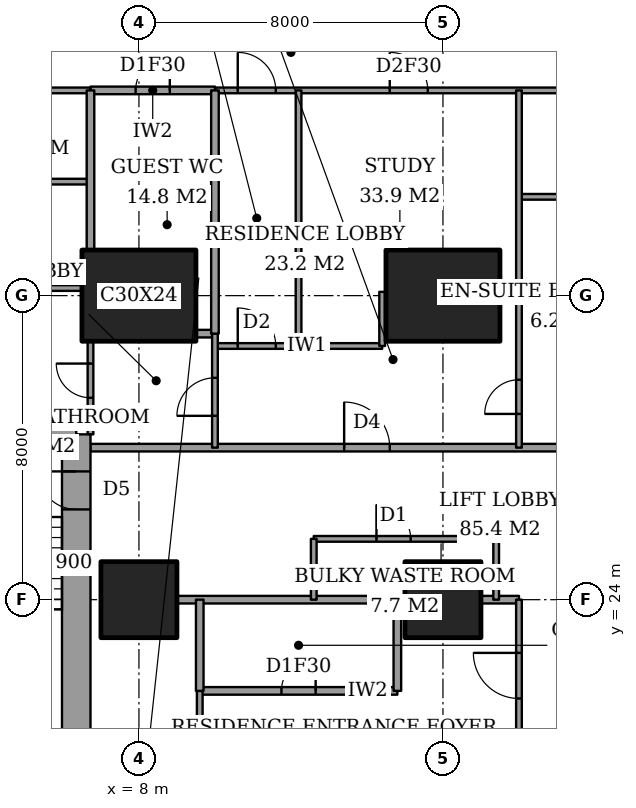
"""IFC4 building model, lengths in metres.
Left out: names, types, materials, properties, quantities, classifications, styles, units other than length and angle.
Written with IfcOpenShell. Run it as: python <this file> out.ifc"""

import sys

from ifc_helpers import new_model, si_unit, direction, frame, frame_2d, origin, origin_2d, place, context, subcontext, project, spatial, rectangle, extrude, element, fill, save


model = new_model("IFC4")
c1 = context("Model", 3, precision=1e-05, world=origin(), true_north=direction((0.0, 1.0)))
c2 = subcontext(c1, "Body", "Model", "MODEL_VIEW")
j1 = project(units=[si_unit("LENGTHUNIT", "METRE"), si_unit("PLANEANGLEUNIT", "RADIAN")], contexts=[c1])
p1 = place(None, origin())
s1 = spatial("IfcSite", under=j1, at=p1, CompositionType="ELEMENT")
p2 = place(p1, origin())
s2 = spatial("IfcBuilding", under=s1, at=p2, CompositionType="ELEMENT")
p3 = place(p2, frame((0.0, 0.0, 83.6)))
s3 = spatial("IfcBuildingStorey", under=s2, at=p3, CompositionType="ELEMENT", Elevation=83.6)
p4 = place(p3, frame((8.0, 24.0, 0.0), z_axis=(0.0, 0.0, 1.0), x_axis=(1.0, 0.0, 0.0)))
e1 = element("IfcColumn", 1, at=p4, inside=s3, PredefinedType="COLUMN", context=c2, shape_type="SweptSolid", body=[
    extrude(rectangle(XDim=2.0, YDim=2.0, at=origin_2d()), origin(), (0.0, 0.0, 1.0), 3.6),
])
p5 = place(p3, frame((8.0, 32.0, 0.0), z_axis=(0.0, 0.0, 1.0), x_axis=(1.0, 0.0, 0.0)))
e2 = element("IfcColumn", 2, at=p5, inside=s3, PredefinedType="COLUMN", context=c2, shape_type="SweptSolid", body=[
    extrude(rectangle(XDim=3.0, YDim=2.4, at=origin_2d()), origin(), (0.0, 0.0, 1.0), 3.6),
])
p6 = place(p3, frame((16.0, 24.0, 0.0), z_axis=(0.0, 0.0, 1.0), x_axis=(1.0, 0.0, 0.0)))
e3 = element("IfcColumn", 3, at=p6, inside=s3, PredefinedType="COLUMN", context=c2, shape_type="SweptSolid", body=[
    extrude(rectangle(XDim=2.0, YDim=2.0, at=origin_2d()), origin(), (0.0, 0.0, 1.0), 3.6),
])
p7 = place(p3, frame((16.0, 32.0, 0.0), z_axis=(0.0, 0.0, 1.0), x_axis=(1.0, 0.0, 0.0)))
e4 = element("IfcColumn", 4, at=p7, inside=s3, PredefinedType="COLUMN", context=c2, shape_type="SweptSolid", body=[
    extrude(rectangle(XDim=3.0, YDim=2.4, at=origin_2d()), origin(), (0.0, 0.0, 1.0), 3.6),
])
p8 = place(p3, frame((6.35, 19.65, 0.0), z_axis=(0.0, 0.0, 1.0), x_axis=(0.0, 1.0, 0.0)))
e5 = element("IfcWall", 5, at=p8, inside=s3, PredefinedType="SHEAR", context=c2, shape_type="SweptSolid", body=[
    extrude(rectangle(XDim=8.7, YDim=0.75, at=frame_2d((4.35, 0.0))), origin(), (0.0, 0.0, 1.0), 3.6),
])
p9 = place(p8, frame((6.725, 0.0, 0.0)))
e6 = element("IfcOpeningElement", 6, at=p9, cuts=e5, PredefinedType="OPENING", context=c2, shape_type="SweptSolid", body=[
    extrude(rectangle(XDim=1.0, YDim=2.1, at=frame_2d((0.5, 1.05))), frame((0.0, 0.385, 0.0), z_axis=(0.0, -1.0, 0.0), x_axis=(1.0, 0.0, 0.0)), (0.0, 0.0, 1.0), 0.77),
])
p10 = place(p3, frame((6.35, 28.35, 0.0), z_axis=(0.0, 0.0, 1.0), x_axis=(-1.0, 0.0, 0.0)))
e7 = element("IfcWall", 7, at=p10, inside=s3, PredefinedType="SHEAR", context=c2, shape_type="SweptSolid", body=[
    extrude(rectangle(XDim=4.45, YDim=0.75, at=frame_2d((2.225, 0.0))), origin(), (0.0, 0.0, 1.0), 3.6),
])
p11 = place(p3, frame((9.6, 21.6, 0.0), z_axis=(0.0, 0.0, 1.0), x_axis=(1.0, 0.0, 0.0)))
e8 = element("IfcWall", 8, at=p11, inside=s3, PredefinedType="PARTITIONING", context=c2, shape_type="SweptSolid", body=[
    extrude(rectangle(XDim=5.2, YDim=0.2, at=frame_2d((2.6, 0.0))), origin(), (0.0, 0.0, 1.0), 3.35),
])
p12 = place(p11, frame((2.15, 0.0, 0.0)))
e9 = element("IfcOpeningElement", 9, at=p12, cuts=e8, PredefinedType="OPENING", context=c2, shape_type="SweptSolid", body=[
    extrude(rectangle(XDim=0.9, YDim=2.1, at=frame_2d((0.45, 1.05))), frame((0.0, 0.11, 0.0), z_axis=(0.0, -1.0, 0.0), x_axis=(1.0, 0.0, 0.0)), (0.0, 0.0, 1.0), 0.22),
])
p13 = place(p3, frame((9.0, 24.0, 0.0), z_axis=(0.0, 0.0, 1.0), x_axis=(1.0, 0.0, 0.0)))
e10 = element("IfcWall", 10, at=p13, inside=s3, PredefinedType="PARTITIONING", context=c2, shape_type="SweptSolid", body=[
    extrude(rectangle(XDim=6.0, YDim=0.2, at=frame_2d((3.0, 0.0))), origin(), (0.0, 0.0, 1.0), 3.35),
])
p14 = place(p3, frame((17.0, 24.0, 0.0), z_axis=(0.0, 0.0, 1.0), x_axis=(1.0, 0.0, 0.0)))
e11 = element("IfcWall", 11, at=p14, inside=s3, PredefinedType="PARTITIONING", context=c2, shape_type="SweptSolid", body=[
    extrude(rectangle(XDim=1.0, YDim=0.2, at=frame_2d((0.5, 0.0))), origin(), (0.0, 0.0, 1.0), 3.35),
])
p15 = place(p3, frame((12.6, 25.6, 0.0), z_axis=(0.0, 0.0, 1.0), x_axis=(1.0, 0.0, 0.0)))
e12 = element("IfcWall", 12, at=p15, inside=s3, PredefinedType="PARTITIONING", context=c2, shape_type="SweptSolid", body=[
    extrude(rectangle(XDim=4.8, YDim=0.15, at=frame_2d((2.4, 0.0))), origin(), (0.0, 0.0, 1.0), 3.35),
])
p16 = place(p15, frame((1.65, 0.0, 0.0)))
e13 = element("IfcOpeningElement", 13, at=p16, cuts=e12, PredefinedType="OPENING", context=c2, shape_type="SweptSolid", body=[
    extrude(rectangle(XDim=0.9, YDim=2.1, at=frame_2d((0.45, 1.05))), frame((0.0, 0.085, 0.0), z_axis=(0.0, -1.0, 0.0), x_axis=(1.0, 0.0, 0.0)), (0.0, 0.0, 1.0), 0.17),
])
p17 = place(p3, frame((6.725, 28.0, 0.0), z_axis=(0.0, 0.0, 1.0), x_axis=(1.0, 0.0, 0.0)))
e14 = element("IfcWall", 14, at=p17, inside=s3, PredefinedType="PARTITIONING", context=c2, shape_type="SweptSolid", body=[
    extrude(rectangle(XDim=17.275, YDim=0.2, at=frame_2d((8.637, 0.0))), origin(), (0.0, 0.0, 1.0), 3.35),
])
p18 = place(p17, frame((6.675, 0.0, 0.0)))
e15 = element("IfcOpeningElement", 15, at=p18, cuts=e14, PredefinedType="OPENING", context=c2, shape_type="SweptSolid", body=[
    extrude(rectangle(XDim=1.2, YDim=2.4, at=frame_2d((0.6, 1.2))), frame((0.0, 0.11, 0.0), z_axis=(0.0, -1.0, 0.0), x_axis=(1.0, 0.0, 0.0)), (0.0, 0.0, 1.0), 0.22),
])
p19 = place(p3, frame((10.0, 30.675, 0.0), z_axis=(0.0, 0.0, 1.0), x_axis=(1.0, 0.0, 0.0)))
e16 = element("IfcWall", 16, at=p19, inside=s3, PredefinedType="PARTITIONING", context=c2, shape_type="SweptSolid", body=[
    extrude(rectangle(XDim=4.4, YDim=0.15, at=frame_2d((2.2, 0.0))), origin(), (0.0, 0.0, 1.0), 3.35),
])
p20 = place(p19, frame((0.6, 0.0, 0.0)))
e17 = element("IfcOpeningElement", 17, at=p20, cuts=e16, PredefinedType="OPENING", context=c2, shape_type="SweptSolid", body=[
    extrude(rectangle(XDim=1.0, YDim=2.1, at=frame_2d((0.5, 1.05))), frame((0.0, 0.085, 0.0), z_axis=(0.0, -1.0, 0.0), x_axis=(1.0, 0.0, 0.0)), (0.0, 0.0, 1.0), 0.17),
])
p21 = place(p3, frame((9.5, 31.0, 0.0), z_axis=(0.0, 0.0, 1.0), x_axis=(1.0, 0.0, 0.0)))
e18 = element("IfcWall", 18, at=p21, inside=s3, PredefinedType="PARTITIONING", context=c2, shape_type="SweptSolid", body=[
    extrude(rectangle(XDim=0.5, YDim=0.2, at=frame_2d((0.25, 0.0))), origin(), (0.0, 0.0, 1.0), 3.35),
])
p22 = place(p3, frame((18.0, 32.0, 0.0), z_axis=(0.0, 0.0, 1.0), x_axis=(1.0, 0.0, 0.0)))
e19 = element("IfcWall", 19, at=p22, inside=s3, PredefinedType="PARTITIONING", context=c2, shape_type="SweptSolid", body=[
    extrude(rectangle(XDim=6.0, YDim=0.15, at=frame_2d((3.0, 0.0))), origin(), (0.0, 0.0, 1.0), 2.634),
])
p23 = place(p3, frame((17.5, 32.1, 0.0), z_axis=(0.0, 0.0, 1.0), x_axis=(1.0, 0.0, 0.0)))
e20 = element("IfcWall", 20, at=p23, inside=s3, PredefinedType="PARTITIONING", context=c2, shape_type="SweptSolid", body=[
    extrude(rectangle(XDim=0.5, YDim=0.15, at=frame_2d((0.25, 0.0))), origin(), (0.0, 0.0, 1.0), 2.634),
])
p24 = place(p3, frame((1.35, 32.2, 0.0), z_axis=(0.0, 0.0, 1.0), x_axis=(1.0, 0.0, 0.0)))
e21 = element("IfcWall", 21, at=p24, inside=s3, PredefinedType="PARTITIONING", context=c2, shape_type="SweptSolid", body=[
    extrude(rectangle(XDim=5.15, YDim=0.15, at=frame_2d((2.575, 0.0))), origin(), (0.0, 0.0, 1.0), 3.35),
])
p25 = place(p3, frame((18.0, 34.6, 0.0), z_axis=(0.0, 0.0, 1.0), x_axis=(1.0, 0.0, 0.0)))
e22 = element("IfcWall", 22, at=p25, inside=s3, PredefinedType="PARTITIONING", context=c2, shape_type="SweptSolid", body=[
    extrude(rectangle(XDim=2.4, YDim=0.15, at=frame_2d((1.2, 0.0))), origin(), (0.0, 0.0, 1.0), 3.35),
])
p26 = place(p3, frame((4.125, 35.0, 0.0), z_axis=(0.0, 0.0, 1.0), x_axis=(1.0, 0.0, 0.0)))
e23 = element("IfcWall", 23, at=p26, inside=s3, PredefinedType="PARTITIONING", context=c2, shape_type="SweptSolid", body=[
    extrude(rectangle(XDim=2.6, YDim=0.15, at=frame_2d((1.3, 0.0))), origin(), (0.0, 0.0, 1.0), 3.35),
])
p27 = place(p3, frame((6.725, 37.4, 0.0), z_axis=(0.0, 0.0, 1.0), x_axis=(1.0, 0.0, 0.0)))
e24 = element("IfcWall", 24, at=p27, inside=s3, PredefinedType="PARTITIONING", context=c2, shape_type="SweptSolid", body=[
    extrude(rectangle(XDim=3.275, YDim=0.2, at=frame_2d((1.637, 0.0))), origin(), (0.0, 0.0, 1.0), 3.35),
])
p28 = place(p27, frame((1.188, 0.0, 0.0)))
e25 = element("IfcOpeningElement", 25, at=p28, cuts=e24, PredefinedType="OPENING", context=c2, shape_type="SweptSolid", body=[
    extrude(rectangle(XDim=0.9, YDim=2.1, at=frame_2d((0.45, 1.05))), frame((0.0, 0.11, 0.0), z_axis=(0.0, -1.0, 0.0), x_axis=(1.0, 0.0, 0.0)), (0.0, 0.0, 1.0), 0.22),
])
p29 = place(p3, frame((-0.45, 37.4, 0.0), z_axis=(0.0, 0.0, 1.0), x_axis=(1.0, 0.0, 0.0)))
e26 = element("IfcWall", 26, at=p29, inside=s3, PredefinedType="PARTITIONING", context=c2, shape_type="SweptSolid", body=[
    extrude(rectangle(XDim=7.175, YDim=0.15, at=frame_2d((3.587, 0.0))), origin(), (0.0, 0.0, 1.0), 3.35),
])
p30 = place(p29, frame((3.087, 0.0, 0.0)))
e27 = element("IfcOpeningElement", 27, at=p30, cuts=e26, PredefinedType="OPENING", context=c2, shape_type="SweptSolid", body=[
    extrude(rectangle(XDim=1.0, YDim=2.1, at=frame_2d((0.5, 1.05))), frame((0.0, 0.085, 0.0), z_axis=(0.0, -1.0, 0.0), x_axis=(1.0, 0.0, 0.0)), (0.0, 0.0, 1.0), 0.17),
])
p31 = place(p3, frame((10.0, 37.4, 0.0), z_axis=(0.0, 0.0, 1.0), x_axis=(1.0, 0.0, 0.0)))
e28 = element("IfcWall", 28, at=p31, inside=s3, PredefinedType="PARTITIONING", context=c2, shape_type="SweptSolid", body=[
    extrude(rectangle(XDim=14.561, YDim=0.15, at=frame_2d((7.281, 0.0))), origin(), (0.0, 0.0, 1.0), 3.35),
])
p32 = place(p31, frame((0.6, 0.0, 0.0)))
e29 = element("IfcOpeningElement", 29, at=p32, cuts=e28, PredefinedType="OPENING", context=c2, shape_type="SweptSolid", body=[
    extrude(rectangle(XDim=1.0, YDim=2.1, at=frame_2d((0.5, 1.05))), frame((0.0, 0.085, 0.0), z_axis=(0.0, -1.0, 0.0), x_axis=(1.0, 0.0, 0.0)), (0.0, 0.0, 1.0), 0.17),
])
p33 = place(p31, frame((4.6, 0.0, 0.0)))
e30 = element("IfcOpeningElement", 30, at=p33, cuts=e28, PredefinedType="OPENING", context=c2, shape_type="SweptSolid", body=[
    extrude(rectangle(XDim=1.0, YDim=2.1, at=frame_2d((0.5, 1.05))), frame((0.0, 0.085, 0.0), z_axis=(0.0, -1.0, 0.0), x_axis=(1.0, 0.0, 0.0)), (0.0, 0.0, 1.0), 0.17),
])
p34 = place(p31, frame((10.725, 0.0, 0.0)))
e31 = element("IfcOpeningElement", 31, at=p34, cuts=e28, PredefinedType="OPENING", context=c2, shape_type="SweptSolid", body=[
    extrude(rectangle(XDim=1.0, YDim=2.1, at=frame_2d((0.5, 1.05))), frame((0.0, 0.085, 0.0), z_axis=(0.0, -1.0, 0.0), x_axis=(1.0, 0.0, 0.0)), (0.0, 0.0, 1.0), 0.17),
])
p35 = place(p3, frame((6.725, 33.2, 0.0), z_axis=(0.0, 0.0, 1.0), x_axis=(0.0, 1.0, 0.0)))
e32 = element("IfcWall", 32, at=p35, inside=s3, PredefinedType="PARTITIONING", context=c2, shape_type="SweptSolid", body=[
    extrude(rectangle(XDim=4.2, YDim=0.2, at=frame_2d((2.1, 0.0))), origin(), (0.0, 0.0, 1.0), 3.35),
])
p36 = place(p3, frame((6.725, 28.35, 0.0), z_axis=(0.0, 0.0, 1.0), x_axis=(0.0, 1.0, 0.0)))
e33 = element("IfcWall", 33, at=p36, inside=s3, PredefinedType="PARTITIONING", context=c2, shape_type="SweptSolid", body=[
    extrude(rectangle(XDim=2.45, YDim=0.15, at=frame_2d((1.225, 0.0))), origin(), (0.0, 0.0, 1.0), 3.35),
])
p37 = place(p36, frame((0.962, 0.0, 0.0)))
e34 = element("IfcOpeningElement", 34, at=p37, cuts=e33, PredefinedType="OPENING", context=c2, shape_type="SweptSolid", body=[
    extrude(rectangle(XDim=0.9, YDim=2.1, at=frame_2d((0.45, 1.05))), frame((0.0, 0.085, 0.0), z_axis=(0.0, -1.0, 0.0), x_axis=(1.0, 0.0, 0.0)), (0.0, 0.0, 1.0), 0.17),
])
p38 = place(p3, frame((9.6, 21.6, 0.0), z_axis=(0.0, 0.0, 1.0), x_axis=(0.0, 1.0, 0.0)))
e35 = element("IfcWall", 35, at=p38, inside=s3, PredefinedType="PARTITIONING", context=c2, shape_type="SweptSolid", body=[
    extrude(rectangle(XDim=2.4, YDim=0.2, at=frame_2d((1.2, 0.0))), origin(), (0.0, 0.0, 1.0), 3.35),
])
p39 = place(p3, frame((9.6, 10.6, 0.0), z_axis=(0.0, 0.0, 1.0), x_axis=(0.0, 1.0, 0.0)))
e36 = element("IfcWall", 36, at=p39, inside=s3, PredefinedType="PARTITIONING", context=c2, shape_type="SweptSolid", body=[
    extrude(rectangle(XDim=11.0, YDim=0.15, at=frame_2d((5.5, 0.0))), origin(), (0.0, 0.0, 1.0), 3.35),
])
p40 = place(p39, frame((7.7, 0.0, 0.0)))
e37 = element("IfcOpeningElement", 37, at=p40, cuts=e36, PredefinedType="OPENING", context=c2, shape_type="SweptSolid", body=[
    extrude(rectangle(XDim=1.0, YDim=2.1, at=frame_2d((0.5, 1.05))), frame((0.0, 0.085, 0.0), z_axis=(0.0, -1.0, 0.0), x_axis=(1.0, 0.0, 0.0)), (0.0, 0.0, 1.0), 0.17),
])
p41 = place(p3, frame((10.0, 31.0, 0.0), z_axis=(0.0, 0.0, 1.0), x_axis=(0.0, 1.0, 0.0)))
e38 = element("IfcWall", 38, at=p41, inside=s3, PredefinedType="PARTITIONING", context=c2, shape_type="SweptSolid", body=[
    extrude(rectangle(XDim=6.4, YDim=0.2, at=frame_2d((3.2, 0.0))), origin(), (0.0, 0.0, 1.0), 3.35),
])
p42 = place(p3, frame((10.0, 28.0, 0.0), z_axis=(0.0, 0.0, 1.0), x_axis=(0.0, 1.0, 0.0)))
e39 = element("IfcWall", 39, at=p42, inside=s3, PredefinedType="PARTITIONING", context=c2, shape_type="SweptSolid", body=[
    extrude(rectangle(XDim=3.0, YDim=0.15, at=frame_2d((1.5, 0.0))), origin(), (0.0, 0.0, 1.0), 3.35),
])
p43 = place(p42, frame((0.837, 0.0, 0.0)))
e40 = element("IfcOpeningElement", 40, at=p43, cuts=e39, PredefinedType="OPENING", context=c2, shape_type="SweptSolid", body=[
    extrude(rectangle(XDim=1.0, YDim=2.1, at=frame_2d((0.5, 1.05))), frame((0.0, 0.085, 0.0), z_axis=(0.0, -1.0, 0.0), x_axis=(1.0, 0.0, 0.0)), (0.0, 0.0, 1.0), 0.17),
])
p44 = place(p3, frame((12.2, 30.675, 0.0), z_axis=(0.0, 0.0, 1.0), x_axis=(0.0, 1.0, 0.0)))
e41 = element("IfcWall", 41, at=p44, inside=s3, PredefinedType="PARTITIONING", context=c2, shape_type="SweptSolid", body=[
    extrude(rectangle(XDim=6.725, YDim=0.15, at=frame_2d((3.362, 0.0))), origin(), (0.0, 0.0, 1.0), 3.35),
])
p45 = place(p3, frame((12.6, 24.0, 0.0), z_axis=(0.0, 0.0, 1.0), x_axis=(0.0, 1.0, 0.0)))
e42 = element("IfcWall", 42, at=p45, inside=s3, PredefinedType="PARTITIONING", context=c2, shape_type="SweptSolid", body=[
    extrude(rectangle(XDim=1.6, YDim=0.15, at=frame_2d((0.8, 0.0))), origin(), (0.0, 0.0, 1.0), 3.35),
])
p46 = place(p3, frame((14.4, 30.675, 0.0), z_axis=(0.0, 0.0, 1.0), x_axis=(0.0, 1.0, 0.0)))
e43 = element("IfcWall", 43, at=p46, inside=s3, PredefinedType="PARTITIONING", context=c2, shape_type="SweptSolid", body=[
    extrude(rectangle(XDim=1.425, YDim=0.15, at=frame_2d((0.712, 0.0))), origin(), (0.0, 0.0, 1.0), 3.35),
])
p47 = place(p3, frame((14.8, 21.6, 0.0), z_axis=(0.0, 0.0, 1.0), x_axis=(0.0, 1.0, 0.0)))
e44 = element("IfcWall", 44, at=p47, inside=s3, PredefinedType="PARTITIONING", context=c2, shape_type="SweptSolid", body=[
    extrude(rectangle(XDim=2.4, YDim=0.2, at=frame_2d((1.2, 0.0))), origin(), (0.0, 0.0, 1.0), 3.35),
])
p48 = place(p3, frame((17.4, 24.0, 0.0), z_axis=(0.0, 0.0, 1.0), x_axis=(0.0, 1.0, 0.0)))
e45 = element("IfcWall", 45, at=p48, inside=s3, PredefinedType="PARTITIONING", context=c2, shape_type="SweptSolid", body=[
    extrude(rectangle(XDim=1.6, YDim=0.15, at=frame_2d((0.8, 0.0))), origin(), (0.0, 0.0, 1.0), 3.35),
])
p49 = place(p3, frame((18.0, 10.6, 0.0), z_axis=(0.0, 0.0, 1.0), x_axis=(0.0, 1.0, 0.0)))
e46 = element("IfcWall", 46, at=p49, inside=s3, PredefinedType="PARTITIONING", context=c2, shape_type="SweptSolid", body=[
    extrude(rectangle(XDim=13.4, YDim=0.15, at=frame_2d((6.7, 0.0))), origin(), (0.0, 0.0, 1.0), 3.35),
])
p50 = place(p49, frame((10.8, 0.0, 0.0)))
e47 = element("IfcOpeningElement", 47, at=p50, cuts=e46, PredefinedType="OPENING", context=c2, shape_type="SweptSolid", body=[
    extrude(rectangle(XDim=1.2, YDim=2.4, at=frame_2d((0.6, 1.2))), frame((0.0, 0.085, 0.0), z_axis=(0.0, -1.0, 0.0), x_axis=(1.0, 0.0, 0.0)), (0.0, 0.0, 1.0), 0.17),
])
p51 = place(p49, frame((7.25, 0.0, 0.0)))
e48 = element("IfcOpeningElement", 48, at=p51, cuts=e46, PredefinedType="OPENING", context=c2, shape_type="SweptSolid", body=[
    extrude(rectangle(XDim=0.9, YDim=2.1, at=frame_2d((0.45, 1.05))), frame((0.0, 0.085, 0.0), z_axis=(0.0, -1.0, 0.0), x_axis=(1.0, 0.0, 0.0)), (0.0, 0.0, 1.0), 0.17),
])
p52 = place(p3, frame((18.0, 28.0, 0.0), z_axis=(0.0, 0.0, 1.0), x_axis=(0.0, 1.0, 0.0)))
e49 = element("IfcWall", 49, at=p52, inside=s3, PredefinedType="PARTITIONING", context=c2, shape_type="SweptSolid", body=[
    extrude(rectangle(XDim=9.4, YDim=0.15, at=frame_2d((4.7, 0.0))), origin(), (0.0, 0.0, 1.0), 3.35),
])
p53 = place(p52, frame((0.887, 0.0, 0.0)))
e50 = element("IfcOpeningElement", 50, at=p53, cuts=e49, PredefinedType="OPENING", context=c2, shape_type="SweptSolid", body=[
    extrude(rectangle(XDim=0.9, YDim=2.1, at=frame_2d((0.45, 1.05))), frame((0.0, 0.085, 0.0), z_axis=(0.0, -1.0, 0.0), x_axis=(1.0, 0.0, 0.0)), (0.0, 0.0, 1.0), 0.17),
])
p54 = place(p12, origin())
e51 = element("IfcDoor", 51, at=p54, inside=s3, OperationType="SINGLE_SWING_LEFT", PredefinedType="DOOR", context=c2, shape_type="SweptSolid", body=[
    extrude(rectangle(XDim=0.9, YDim=2.1, at=frame_2d((0.45, 1.05))), frame((0.0, 0.025, 0.0), z_axis=(0.0, -1.0, 0.0), x_axis=(1.0, 0.0, 0.0)), (0.0, 0.0, 1.0), 0.05),
])
fill(e9, e51)
p55 = place(p50, origin())
e52 = element("IfcDoor", 52, at=p55, inside=s3, OperationType="SINGLE_SWING_LEFT", PredefinedType="DOOR", context=c2, shape_type="SweptSolid", body=[
    extrude(rectangle(XDim=1.2, YDim=2.4, at=frame_2d((0.6, 1.2))), frame((0.0, 0.025, 0.0), z_axis=(0.0, -1.0, 0.0), x_axis=(1.0, 0.0, 0.0)), (0.0, 0.0, 1.0), 0.05),
])
fill(e47, e52)
p56 = place(p32, origin())
e53 = element("IfcDoor", 53, at=p56, inside=s3, OperationType="SINGLE_SWING_RIGHT", PredefinedType="DOOR", context=c2, shape_type="SweptSolid", body=[
    extrude(rectangle(XDim=1.0, YDim=2.1, at=frame_2d((0.5, 1.05))), frame((0.0, 0.025, 0.0), z_axis=(0.0, -1.0, 0.0), x_axis=(1.0, 0.0, 0.0)), (0.0, 0.0, 1.0), 0.05),
])
fill(e29, e53)
p57 = place(p37, origin())
e54 = element("IfcDoor", 54, at=p57, inside=s3, OperationType="SINGLE_SWING_LEFT", PredefinedType="DOOR", context=c2, shape_type="SweptSolid", body=[
    extrude(rectangle(XDim=0.9, YDim=2.1, at=frame_2d((0.45, 1.05))), frame((0.0, 0.025, 0.0), z_axis=(0.0, -1.0, 0.0), x_axis=(1.0, 0.0, 0.0)), (0.0, 0.0, 1.0), 0.05),
])
fill(e34, e54)
p58 = place(p28, origin())
e55 = element("IfcDoor", 55, at=p58, inside=s3, OperationType="SINGLE_SWING_LEFT", PredefinedType="DOOR", context=c2, shape_type="SweptSolid", body=[
    extrude(rectangle(XDim=0.9, YDim=2.1, at=frame_2d((0.45, 1.05))), frame((0.0, 0.025, 0.0), z_axis=(0.0, -1.0, 0.0), x_axis=(1.0, 0.0, 0.0)), (0.0, 0.0, 1.0), 0.05),
])
fill(e25, e55)
p59 = place(p43, origin())
e56 = element("IfcDoor", 56, at=p59, inside=s3, OperationType="SINGLE_SWING_RIGHT", PredefinedType="DOOR", context=c2, shape_type="SweptSolid", body=[
    extrude(rectangle(XDim=1.0, YDim=2.1, at=frame_2d((0.5, 1.05))), frame((0.0, 0.025, 0.0), z_axis=(0.0, -1.0, 0.0), x_axis=(1.0, 0.0, 0.0)), (0.0, 0.0, 1.0), 0.05),
])
fill(e40, e56)
p60 = place(p18, origin())
e57 = element("IfcDoor", 57, at=p60, inside=s3, OperationType="SINGLE_SWING_RIGHT", PredefinedType="DOOR", context=c2, shape_type="SweptSolid", body=[
    extrude(rectangle(XDim=1.2, YDim=2.4, at=frame_2d((0.6, 1.2))), frame((0.0, 0.025, 0.0), z_axis=(0.0, -1.0, 0.0), x_axis=(1.0, 0.0, 0.0)), (0.0, 0.0, 1.0), 0.05),
])
fill(e15, e57)
p61 = place(p20, origin())
e58 = element("IfcDoor", 58, at=p61, inside=s3, OperationType="SINGLE_SWING_RIGHT", PredefinedType="DOOR", context=c2, shape_type="SweptSolid", body=[
    extrude(rectangle(XDim=1.0, YDim=2.1, at=frame_2d((0.5, 1.05))), frame((0.0, 0.025, 0.0), z_axis=(0.0, -1.0, 0.0), x_axis=(1.0, 0.0, 0.0)), (0.0, 0.0, 1.0), 0.05),
])
fill(e17, e58)
p62 = place(p33, origin())
e59 = element("IfcDoor", 59, at=p62, inside=s3, OperationType="SINGLE_SWING_RIGHT", PredefinedType="DOOR", context=c2, shape_type="SweptSolid", body=[
    extrude(rectangle(XDim=1.0, YDim=2.1, at=frame_2d((0.5, 1.05))), frame((0.0, 0.025, 0.0), z_axis=(0.0, -1.0, 0.0), x_axis=(1.0, 0.0, 0.0)), (0.0, 0.0, 1.0), 0.05),
])
fill(e30, e59)
p63 = place(p53, origin())
e60 = element("IfcDoor", 60, at=p63, inside=s3, OperationType="SINGLE_SWING_RIGHT", PredefinedType="DOOR", context=c2, shape_type="SweptSolid", body=[
    extrude(rectangle(XDim=0.9, YDim=2.1, at=frame_2d((0.45, 1.05))), frame((0.0, 0.025, 0.0), z_axis=(0.0, -1.0, 0.0), x_axis=(1.0, 0.0, 0.0)), (0.0, 0.0, 1.0), 0.05),
])
fill(e50, e60)
p64 = place(p16, origin())
e61 = element("IfcDoor", 61, at=p64, inside=s3, OperationType="SINGLE_SWING_RIGHT", PredefinedType="DOOR", context=c2, shape_type="SweptSolid", body=[
    extrude(rectangle(XDim=0.9, YDim=2.1, at=frame_2d((0.45, 1.05))), frame((0.0, 0.025, 0.0), z_axis=(0.0, -1.0, 0.0), x_axis=(1.0, 0.0, 0.0)), (0.0, 0.0, 1.0), 0.05),
])
fill(e13, e61)
p65 = place(p9, origin())
e62 = element("IfcDoor", 62, at=p65, inside=s3, OperationType="SINGLE_SWING_LEFT", PredefinedType="DOOR", context=c2, shape_type="SweptSolid", body=[
    extrude(rectangle(XDim=1.0, YDim=2.1, at=frame_2d((0.5, 1.05))), frame((0.0, 0.025, 0.0), z_axis=(0.0, -1.0, 0.0), x_axis=(1.0, 0.0, 0.0)), (0.0, 0.0, 1.0), 0.05),
])
fill(e6, e62)
save(model, sys.argv[1])
